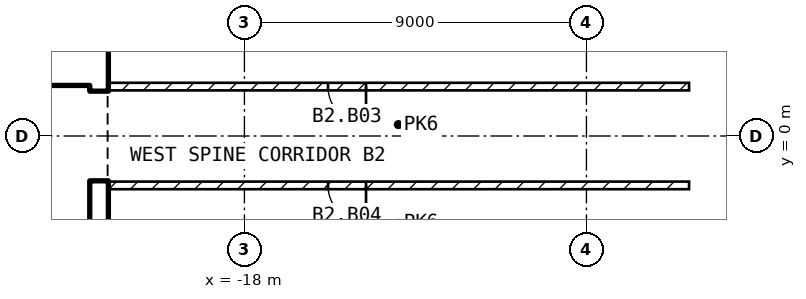
"""IFC4 building model, lengths in metres.
Left out: names, types, materials, properties, quantities, classifications, styles, units other than length and angle.
Written with IfcOpenShell. Run it as: python <this file> out.ifc"""

import sys

from ifc_helpers import new_model, si_unit, direction, frame, frame_2d, origin, place, context, subcontext, project, spatial, rectangle, extrude, element, fill, save


model = new_model("IFC4")
c1 = context("Model", 3, precision=1e-05, world=origin(), true_north=direction((0.0, 1.0)))
c2 = subcontext(c1, "Body", "Model", "MODEL_VIEW")
j1 = project(units=[si_unit("LENGTHUNIT", "METRE"), si_unit("PLANEANGLEUNIT", "RADIAN")], contexts=[c1])
p1 = place(None, origin())
s1 = spatial("IfcSite", under=j1, at=p1, CompositionType="ELEMENT")
p2 = place(p1, origin())
s2 = spatial("IfcBuilding", under=s1, at=p2, CompositionType="ELEMENT")
p3 = place(p2, frame((0.0, 0.0, -8.7)))
s3 = spatial("IfcBuildingStorey", under=s2, at=p3, CompositionType="ELEMENT", Elevation=-8.7)
for number, where, z_axis, x_axis in (
    (1, (-21.825, -8.1, 0.0), (0.0, 0.0, 1.0), (0.0, 1.0, 0.0)),
    (2, (-21.825, 1.2, 0.0), (0.0, 0.0, 1.0), (0.0, 1.0, 0.0)),
):
    element("IfcWall", number, at=place(p3, frame(where, z_axis=z_axis, x_axis=x_axis)), inside=s3, PredefinedType="SHEAR", context=c2, shape_type="SweptSolid", body=[
        extrude(rectangle(XDim=6.9, YDim=0.45, at=frame_2d((3.45, 0.0))), origin(), (0.0, 0.0, 1.0), 3.9),
    ])
p4 = place(p3, frame((-35.1, 1.45, 0.0), z_axis=(0.0, 0.0, 1.0), x_axis=(1.0, 0.0, 0.0)))
e3 = element("IfcWall", 3, at=p4, inside=s3, PredefinedType="SOLIDWALL", context=c2, shape_type="SweptSolid", body=[
    extrude(rectangle(XDim=13.05, YDim=0.2, at=frame_2d((6.525, 0.0))), origin(), (0.0, 0.0, 1.0), 3.9),
])
p5 = place(p4, frame((11.3, 0.0, 0.0)))
e4 = element("IfcOpeningElement", 4, at=p5, cuts=e3, PredefinedType="OPENING", context=c2, shape_type="SweptSolid", body=[
    extrude(rectangle(XDim=1.0, YDim=2.1, at=frame_2d((0.5, 1.05))), frame((0.0, 0.11, 0.0), z_axis=(0.0, -1.0, 0.0), x_axis=(1.0, 0.0, 0.0)), (0.0, 0.0, 1.0), 0.22),
])
p6 = place(p4, frame((8.8, 0.0, 0.0)))
e5 = element("IfcOpeningElement", 5, at=p6, cuts=e3, PredefinedType="OPENING", context=c2, shape_type="SweptSolid", body=[
    extrude(rectangle(XDim=1.0, YDim=2.1, at=frame_2d((0.5, 1.05))), frame((0.0, 0.11, 0.0), z_axis=(0.0, -1.0, 0.0), x_axis=(1.0, 0.0, 0.0)), (0.0, 0.0, 1.0), 0.22),
])
p7 = place(p4, frame((2.15, 0.0, 0.0)))
e6 = element("IfcOpeningElement", 6, at=p7, cuts=e3, PredefinedType="OPENING", context=c2, shape_type="SweptSolid", body=[
    extrude(rectangle(XDim=0.9, YDim=2.1, at=frame_2d((0.45, 1.05))), frame((0.0, 0.11, 0.0), z_axis=(0.0, -1.0, 0.0), x_axis=(1.0, 0.0, 0.0)), (0.0, 0.0, 1.0), 0.22),
])
p8 = place(p3, frame((-6.3, 1.3, 0.0), z_axis=(0.0, 0.0, 1.0), x_axis=(-1.0, 0.0, 0.0)))
e7 = element("IfcWall", 7, at=p8, inside=s3, PredefinedType="PARTITIONING", context=c2, shape_type="SweptSolid", body=[
    extrude(rectangle(XDim=15.3, YDim=0.2, at=frame_2d((7.65, 0.0))), origin(), (0.0, 0.0, 1.0), 3.9),
])
p9 = place(p8, frame((8.5, 0.0, 0.0)))
e8 = element("IfcOpeningElement", 8, at=p9, cuts=e7, PredefinedType="OPENING", context=c2, shape_type="SweptSolid", body=[
    extrude(rectangle(XDim=1.0, YDim=2.1, at=frame_2d((0.5, 1.05))), frame((0.0, 0.11, 0.0), z_axis=(0.0, -1.0, 0.0), x_axis=(1.0, 0.0, 0.0)), (0.0, 0.0, 1.0), 0.22),
])
p10 = place(p3, frame((-6.3, -1.3, 0.0), z_axis=(0.0, 0.0, 1.0), x_axis=(-1.0, 0.0, 0.0)))
e9 = element("IfcWall", 9, at=p10, inside=s3, PredefinedType="PARTITIONING", context=c2, shape_type="SweptSolid", body=[
    extrude(rectangle(XDim=15.3, YDim=0.2, at=frame_2d((7.65, 0.0))), origin(), (0.0, 0.0, 1.0), 3.9),
])
p11 = place(p10, frame((8.5, 0.0, 0.0)))
e10 = element("IfcOpeningElement", 10, at=p11, cuts=e9, PredefinedType="OPENING", context=c2, shape_type="SweptSolid", body=[
    extrude(rectangle(XDim=1.0, YDim=2.1, at=frame_2d((0.5, 1.05))), frame((0.0, 0.11, 0.0), z_axis=(0.0, -1.0, 0.0), x_axis=(1.0, 0.0, 0.0)), (0.0, 0.0, 1.0), 0.22),
])
p12 = place(p5, origin())
e11 = element("IfcDoor", 11, at=p12, inside=s3, OperationType="SINGLE_SWING_LEFT", PredefinedType="DOOR", context=c2, shape_type="SweptSolid", body=[
    extrude(rectangle(XDim=1.0, YDim=2.1, at=frame_2d((0.5, 1.05))), frame((0.0, 0.025, 0.0), z_axis=(0.0, -1.0, 0.0), x_axis=(1.0, 0.0, 0.0)), (0.0, 0.0, 1.0), 0.05),
])
fill(e4, e11)
p13 = place(p9, origin())
e12 = element("IfcDoor", 12, at=p13, inside=s3, OperationType="SINGLE_SWING_LEFT", PredefinedType="DOOR", context=c2, shape_type="SweptSolid", body=[
    extrude(rectangle(XDim=1.0, YDim=2.1, at=frame_2d((0.5, 1.05))), frame((0.0, 0.025, 0.0), z_axis=(0.0, -1.0, 0.0), x_axis=(1.0, 0.0, 0.0)), (0.0, 0.0, 1.0), 0.05),
])
fill(e8, e12)
p14 = place(p11, origin())
e13 = element("IfcDoor", 13, at=p14, inside=s3, OperationType="SINGLE_SWING_LEFT", PredefinedType="DOOR", context=c2, shape_type="SweptSolid", body=[
    extrude(rectangle(XDim=1.0, YDim=2.1, at=frame_2d((0.5, 1.05))), frame((0.0, 0.025, 0.0), z_axis=(0.0, -1.0, 0.0), x_axis=(1.0, 0.0, 0.0)), (0.0, 0.0, 1.0), 0.05),
])
fill(e10, e13)
save(model, sys.argv[1])
